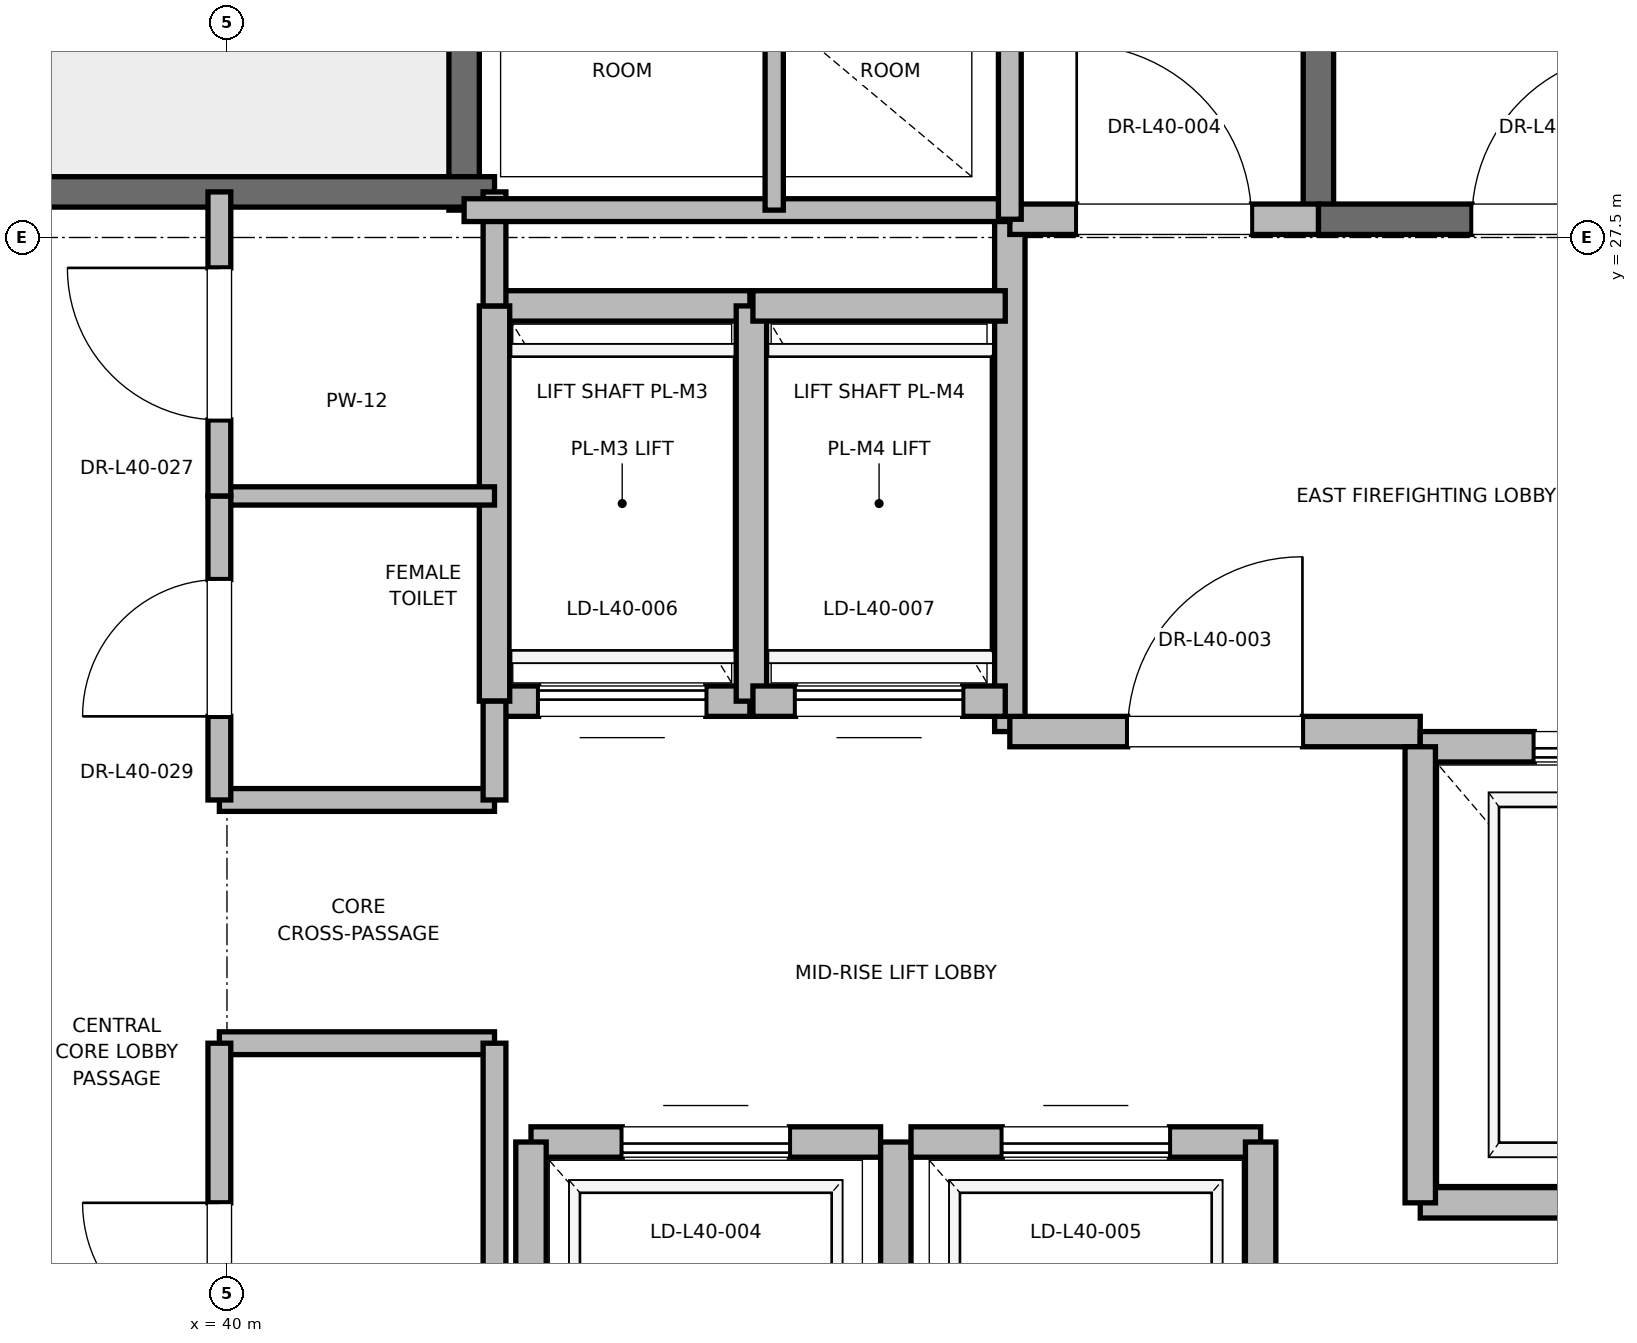
"""IFC4 building model, lengths in metres.
Left out: names, types, materials, properties, quantities, classifications, styles, units other than length and angle.
Written with IfcOpenShell. Run it as: python <this file> out.ifc"""

import sys

from ifc_helpers import new_model, si_unit, direction, frame, frame_2d, origin, place, context, subcontext, project, spatial, rectangle, extrude, element, fill, save


model = new_model("IFC4")
c1 = context("Model", 3, precision=1e-05, world=origin(), true_north=direction((0.0, 1.0)))
c2 = subcontext(c1, "Body", "Model", "MODEL_VIEW")
j1 = project(units=[si_unit("LENGTHUNIT", "METRE"), si_unit("PLANEANGLEUNIT", "RADIAN")], contexts=[c1])
p1 = place(None, origin())
s1 = spatial("IfcSite", under=j1, at=p1, CompositionType="ELEMENT")
p2 = place(p1, origin())
s2 = spatial("IfcBuilding", under=s1, at=p2, CompositionType="ELEMENT")
p3 = place(p2, frame((0.0, 0.0, 172.4)))
s3 = spatial("IfcBuildingStorey", under=s2, at=p3, CompositionType="ELEMENT", Elevation=172.4)
p4 = place(p3, frame((47.18, 27.62, 0.0), z_axis=(0.0, 0.0, 1.0), x_axis=(0.0, 1.0, 0.0)))
e1 = element("IfcWall", 1, at=p4, inside=s3, PredefinedType="SOLIDWALL", context=c2, shape_type="SweptSolid", body=[
    extrude(rectangle(XDim=8.18, YDim=0.2, at=frame_2d((4.09, 0.0))), origin(), (0.0, 0.0, 1.0), 3.775),
])
p5 = place(p3, frame((47.18, 27.62, 0.0), z_axis=(0.0, 0.0, 1.0), x_axis=(1.0, 0.0, 0.0)))
e2 = element("IfcWall", 2, at=p5, inside=s3, PredefinedType="SOLIDWALL", context=c2, shape_type="SweptSolid", body=[
    extrude(rectangle(XDim=3.12, YDim=0.2, at=frame_2d((1.56, 0.0))), origin(), (0.0, 0.0, 1.0), 3.775),
])
p6 = place(p5, frame((1.01, 0.0, 0.0)))
e3 = element("IfcOpeningElement", 3, at=p6, cuts=e2, PredefinedType="OPENING", context=c2, shape_type="SweptSolid", body=[
    extrude(rectangle(XDim=1.1, YDim=2.15, at=frame_2d((0.55, 1.075))), frame((0.0, 0.1, 0.0), z_axis=(0.0, -1.0, 0.0), x_axis=(1.0, 0.0, 0.0)), (0.0, 0.0, 1.0), 0.2),
])
p7 = place(p3, frame((41.56, 27.68, 0.0), z_axis=(0.0, 0.0, 1.0), x_axis=(0.0, 1.0, 0.0)))
e4 = element("IfcWall", 4, at=p7, inside=s3, PredefinedType="SOLIDWALL", context=c2, shape_type="SweptSolid", body=[
    extrude(rectangle(XDim=8.57, YDim=0.2, at=frame_2d((4.285, 0.0))), origin(), (0.0, 0.0, 1.0), 3.775),
])
p8 = place(p3, frame((38.44, 27.8, 0.0), z_axis=(0.0, 0.0, 1.0), x_axis=(1.0, 0.0, 0.0)))
e5 = element("IfcWall", 5, at=p8, inside=s3, PredefinedType="SOLIDWALL", context=c2, shape_type="SweptSolid", body=[
    extrude(rectangle(XDim=3.32, YDim=0.2, at=frame_2d((1.66, 0.0))), origin(), (0.0, 0.0, 1.0), 3.775),
])
p9 = place(p3, frame((45.15, 24.25, 0.0), z_axis=(0.0, 0.0, 1.0), x_axis=(0.0, 1.0, 0.0)))
e6 = element("IfcWall", 6, at=p9, inside=s3, PredefinedType="PARTITIONING", context=c2, shape_type="SweptSolid", body=[
    extrude(rectangle(XDim=3.37, YDim=0.2, at=frame_2d((1.685, 0.0))), origin(), (0.0, 0.0, 1.0), 3.775),
])
p10 = place(p3, frame((45.15, 24.25, 0.0), z_axis=(0.0, 0.0, 1.0), x_axis=(1.0, 0.0, 0.0)))
e7 = element("IfcWall", 7, at=p10, inside=s3, PredefinedType="PARTITIONING", context=c2, shape_type="SweptSolid", body=[
    extrude(rectangle(XDim=2.7, YDim=0.2, at=frame_2d((1.35, 0.0))), origin(), (0.0, 0.0, 1.0), 3.775),
])
p11 = place(p10, frame((0.775, 0.0, 0.0)))
e8 = element("IfcOpeningElement", 8, at=p11, cuts=e7, PredefinedType="OPENING", context=c2, shape_type="SweptSolid", body=[
    extrude(rectangle(XDim=1.15, YDim=2.2, at=frame_2d((0.575, 1.1))), frame((0.0, 0.1, 0.0), z_axis=(0.0, -1.0, 0.0), x_axis=(1.0, 0.0, 0.0)), (0.0, 0.0, 1.0), 0.2),
])
p12 = place(p3, frame((45.15, 27.62, 0.0), z_axis=(0.0, 0.0, 1.0), x_axis=(1.0, 0.0, 0.0)))
e9 = element("IfcWall", 9, at=p12, inside=s3, PredefinedType="PARTITIONING", context=c2, shape_type="SweptSolid", body=[
    extrude(rectangle(XDim=2.03, YDim=0.2, at=frame_2d((1.015, 0.0))), origin(), (0.0, 0.0, 1.0), 3.775),
])
p13 = place(p12, frame((0.44, 0.0, 0.0)))
e10 = element("IfcOpeningElement", 10, at=p13, cuts=e9, PredefinedType="OPENING", context=c2, shape_type="SweptSolid", body=[
    extrude(rectangle(XDim=1.15, YDim=2.2, at=frame_2d((0.575, 1.1))), frame((0.0, 0.1, 0.0), z_axis=(0.0, -1.0, 0.0), x_axis=(1.0, 0.0, 0.0)), (0.0, 0.0, 1.0), 0.2),
])
p14 = place(p3, frame((47.85, 21.15, 0.0), z_axis=(0.0, 0.0, 1.0), x_axis=(1.0, 0.0, 0.0)))
e11 = element("IfcWall", 11, at=p14, inside=s3, PredefinedType="SOLIDWALL", context=c2, shape_type="SweptSolid", body=[
    extrude(rectangle(XDim=2.6, YDim=0.2, at=frame_2d((1.3, 0.0))), origin(), (0.0, 0.0, 1.0), 3.775),
])
p15 = place(p3, frame((50.45, 24.15, 0.0), z_axis=(0.0, 0.0, 1.0), x_axis=(-1.0, 0.0, 0.0)))
e12 = element("IfcWall", 12, at=p15, inside=s3, PredefinedType="SOLIDWALL", context=c2, shape_type="SweptSolid", body=[
    extrude(rectangle(XDim=2.6, YDim=0.2, at=frame_2d((1.3, 0.0))), origin(), (0.0, 0.0, 1.0), 2.755),
])
p16 = place(p15, frame((0.75, 0.0, 0.0)))
e13 = element("IfcOpeningElement", 13, at=p16, cuts=e12, PredefinedType="OPENING", context=c2, shape_type="SweptSolid", body=[
    extrude(rectangle(XDim=1.1, YDim=2.2, at=frame_2d((0.55, 1.1))), frame((0.0, 0.1, 0.0), z_axis=(0.0, -1.0, 0.0), x_axis=(1.0, 0.0, 0.0)), (0.0, 0.0, 1.0), 0.2),
])
p17 = place(p3, frame((47.85, 24.15, 0.0), z_axis=(0.0, 0.0, 1.0), x_axis=(0.0, -1.0, 0.0)))
e14 = element("IfcWall", 14, at=p17, inside=s3, PredefinedType="SOLIDWALL", context=c2, shape_type="SweptSolid", body=[
    extrude(rectangle(XDim=3.0, YDim=0.2, at=frame_2d((1.5, 0.0))), origin(), (0.0, 0.0, 1.0), 3.775),
])
p18 = place(p3, frame((44.3, 21.55, 0.0), z_axis=(0.0, 0.0, 1.0), x_axis=(-1.0, 0.0, 0.0)))
e15 = element("IfcWall", 15, at=p18, inside=s3, PredefinedType="SOLIDWALL", context=c2, shape_type="SweptSolid", body=[
    extrude(rectangle(XDim=2.3, YDim=0.2, at=frame_2d((1.15, 0.0))), origin(), (0.0, 0.0, 1.0), 3.775),
])
p19 = place(p18, frame((0.6, 0.0, 0.0)))
e16 = element("IfcOpeningElement", 16, at=p19, cuts=e15, PredefinedType="OPENING", context=c2, shape_type="SweptSolid", body=[
    extrude(rectangle(XDim=1.1, YDim=2.2, at=frame_2d((0.55, 1.1))), frame((0.0, 0.1, 0.0), z_axis=(0.0, -1.0, 0.0), x_axis=(1.0, 0.0, 0.0)), (0.0, 0.0, 1.0), 0.2),
])
p20 = place(p3, frame((42.0, 21.55, 0.0), z_axis=(0.0, 0.0, 1.0), x_axis=(0.0, -1.0, 0.0)))
e17 = element("IfcWall", 17, at=p20, inside=s3, PredefinedType="SOLIDWALL", context=c2, shape_type="SweptSolid", body=[
    extrude(rectangle(XDim=2.6, YDim=0.2, at=frame_2d((1.3, 0.0))), origin(), (0.0, 0.0, 1.0), 2.755),
])
p21 = place(p3, frame((44.4, 18.95, 0.0), z_axis=(0.0, 0.0, 1.0), x_axis=(0.0, 1.0, 0.0)))
e18 = element("IfcWall", 18, at=p21, inside=s3, PredefinedType="SOLIDWALL", context=c2, shape_type="SweptSolid", body=[
    extrude(rectangle(XDim=2.6, YDim=0.2, at=frame_2d((1.3, 0.0))), origin(), (0.0, 0.0, 1.0), 3.775),
])
p22 = place(p3, frame((46.8, 21.55, 0.0), z_axis=(0.0, 0.0, 1.0), x_axis=(-1.0, 0.0, 0.0)))
e19 = element("IfcWall", 19, at=p22, inside=s3, PredefinedType="SOLIDWALL", context=c2, shape_type="SweptSolid", body=[
    extrude(rectangle(XDim=2.3, YDim=0.2, at=frame_2d((1.15, 0.0))), origin(), (0.0, 0.0, 1.0), 3.775),
])
p23 = place(p22, frame((0.6, 0.0, 0.0)))
e20 = element("IfcOpeningElement", 20, at=p23, cuts=e19, PredefinedType="OPENING", context=c2, shape_type="SweptSolid", body=[
    extrude(rectangle(XDim=1.1, YDim=2.2, at=frame_2d((0.55, 1.1))), frame((0.0, 0.1, 0.0), z_axis=(0.0, -1.0, 0.0), x_axis=(1.0, 0.0, 0.0)), (0.0, 0.0, 1.0), 0.2),
])
p24 = place(p3, frame((46.8, 18.95, 0.0), z_axis=(0.0, 0.0, 1.0), x_axis=(0.0, 1.0, 0.0)))
e21 = element("IfcWall", 21, at=p24, inside=s3, PredefinedType="SOLIDWALL", context=c2, shape_type="SweptSolid", body=[
    extrude(rectangle(XDim=2.6, YDim=0.2, at=frame_2d((1.3, 0.0))), origin(), (0.0, 0.0, 1.0), 3.775),
])
p25 = place(p3, frame((41.76, 24.45, 0.0), z_axis=(0.0, 0.0, 1.0), x_axis=(1.0, 0.0, 0.0)))
e22 = element("IfcWall", 22, at=p25, inside=s3, PredefinedType="SOLIDWALL", context=c2, shape_type="SweptSolid", body=[
    extrude(rectangle(XDim=1.68, YDim=0.2, at=frame_2d((0.84, 0.0))), origin(), (0.0, 0.0, 1.0), 3.775),
])
p26 = place(p25, frame((0.29, 0.0, 0.0)))
e23 = element("IfcOpeningElement", 23, at=p26, cuts=e22, PredefinedType="OPENING", context=c2, shape_type="SweptSolid", body=[
    extrude(rectangle(XDim=1.1, YDim=2.2, at=frame_2d((0.55, 1.1))), frame((0.0, 0.1, 0.0), z_axis=(0.0, -1.0, 0.0), x_axis=(1.0, 0.0, 0.0)), (0.0, 0.0, 1.0), 0.2),
])
p27 = place(p3, frame((43.44, 27.05, 0.0), z_axis=(0.0, 0.0, 1.0), x_axis=(-1.0, 0.0, 0.0)))
e24 = element("IfcWall", 24, at=p27, inside=s3, PredefinedType="SOLIDWALL", context=c2, shape_type="SweptSolid", body=[
    extrude(rectangle(XDim=1.68, YDim=0.2, at=frame_2d((0.84, 0.0))), origin(), (0.0, 0.0, 1.0), 3.775),
])
for number, where, z_axis, x_axis in (
    (25, (41.76, 27.05, 0.0), (0.0, 0.0, 1.0), (0.0, -1.0, 0.0)),
    (26, (43.45, 24.45, 0.0), (0.0, 0.0, 1.0), (0.0, 1.0, 0.0)),
):
    element("IfcWall", number, at=place(p3, frame(where, z_axis=z_axis, x_axis=x_axis)), inside=s3, PredefinedType="SOLIDWALL", context=c2, shape_type="SweptSolid", body=[
        extrude(rectangle(XDim=2.6, YDim=0.2, at=frame_2d((1.3, 0.0))), origin(), (0.0, 0.0, 1.0), 3.775),
    ])
p28 = place(p3, frame((43.46, 24.45, 0.0), z_axis=(0.0, 0.0, 1.0), x_axis=(1.0, 0.0, 0.0)))
e27 = element("IfcWall", 27, at=p28, inside=s3, PredefinedType="SOLIDWALL", context=c2, shape_type="SweptSolid", body=[
    extrude(rectangle(XDim=1.66, YDim=0.2, at=frame_2d((0.83, 0.0))), origin(), (0.0, 0.0, 1.0), 3.775),
])
p29 = place(p28, frame((0.28, 0.0, 0.0)))
e28 = element("IfcOpeningElement", 28, at=p29, cuts=e27, PredefinedType="OPENING", context=c2, shape_type="SweptSolid", body=[
    extrude(rectangle(XDim=1.1, YDim=2.2, at=frame_2d((0.55, 1.1))), frame((0.0, 0.1, 0.0), z_axis=(0.0, -1.0, 0.0), x_axis=(1.0, 0.0, 0.0)), (0.0, 0.0, 1.0), 0.2),
])
p30 = place(p3, frame((45.12, 27.05, 0.0), z_axis=(0.0, 0.0, 1.0), x_axis=(-1.0, 0.0, 0.0)))
e29 = element("IfcWall", 29, at=p30, inside=s3, PredefinedType="SOLIDWALL", context=c2, shape_type="SweptSolid", body=[
    extrude(rectangle(XDim=1.66, YDim=0.2, at=frame_2d((0.83, 0.0))), origin(), (0.0, 0.0, 1.0), 3.775),
])
for number, where, z_axis, x_axis in (
    (30, (39.95, 22.2, 0.0), (0.0, 0.0, 1.0), (1.0, 0.0, 0.0)),
    (31, (39.95, 23.8, 0.0), (0.0, 0.0, 1.0), (1.0, 0.0, 0.0)),
):
    element("IfcWall", number, at=place(p3, frame(where, z_axis=z_axis, x_axis=x_axis)), inside=s3, PredefinedType="PARTITIONING", context=c2, shape_type="SweptSolid", body=[
        extrude(rectangle(XDim=1.81, YDim=0.15, at=frame_2d((0.905, 0.0))), origin(), (0.0, 0.0, 1.0), 2.85),
    ])
p31 = place(p3, frame((39.95, 25.8, 0.0), z_axis=(0.0, 0.0, 1.0), x_axis=(1.0, 0.0, 0.0)))
e32 = element("IfcWall", 32, at=p31, inside=s3, PredefinedType="PARTITIONING", context=c2, shape_type="SweptSolid", body=[
    extrude(rectangle(XDim=1.81, YDim=0.12, at=frame_2d((0.905, 0.0))), origin(), (0.0, 0.0, 1.0), 2.85),
])
p32 = place(p3, frame((41.76, 18.6, 0.0), z_axis=(0.0, 0.0, 1.0), x_axis=(0.0, 1.0, 0.0)))
e33 = element("IfcWall", 33, at=p32, inside=s3, PredefinedType="PARTITIONING", context=c2, shape_type="SweptSolid", body=[
    extrude(rectangle(XDim=3.6, YDim=0.15, at=frame_2d((1.8, 0.0))), origin(), (0.0, 0.0, 1.0), 2.755),
])
p33 = place(p3, frame((41.76, 23.8, 0.0), z_axis=(0.0, 0.0, 1.0), x_axis=(0.0, 1.0, 0.0)))
e34 = element("IfcWall", 34, at=p33, inside=s3, PredefinedType="PARTITIONING", context=c2, shape_type="SweptSolid", body=[
    extrude(rectangle(XDim=0.65, YDim=0.15, at=frame_2d((0.325, 0.0))), origin(), (0.0, 0.0, 1.0), 2.85),
])
p34 = place(p3, frame((41.76, 27.05, 0.0), z_axis=(0.0, 0.0, 1.0), x_axis=(0.0, 1.0, 0.0)))
e35 = element("IfcWall", 35, at=p34, inside=s3, PredefinedType="PARTITIONING", context=c2, shape_type="SweptSolid", body=[
    extrude(rectangle(XDim=0.75, YDim=0.15, at=frame_2d((0.375, 0.0))), origin(), (0.0, 0.0, 1.0), 2.85),
])
p35 = place(p3, frame((39.95, 19.2, 0.0), z_axis=(0.0, 0.0, 1.0), x_axis=(0.0, 1.0, 0.0)))
e36 = element("IfcWall", 36, at=p35, inside=s3, PredefinedType="PARTITIONING", context=c2, shape_type="SweptSolid", body=[
    extrude(rectangle(XDim=3.0, YDim=0.15, at=frame_2d((1.5, 0.0))), origin(), (0.0, 0.0, 1.0), 2.85),
])
p36 = place(p35, frame((1.05, 0.0, 0.0)))
e37 = element("IfcOpeningElement", 37, at=p36, cuts=e36, PredefinedType="OPENING", context=c2, shape_type="SweptSolid", body=[
    extrude(rectangle(XDim=0.9, YDim=2.1, at=frame_2d((0.45, 1.05))), frame((0.0, 0.075, 0.0), z_axis=(0.0, -1.0, 0.0), x_axis=(1.0, 0.0, 0.0)), (0.0, 0.0, 1.0), 0.15),
])
p37 = place(p3, frame((39.95, 23.8, 0.0), z_axis=(0.0, 0.0, 1.0), x_axis=(0.0, 1.0, 0.0)))
e38 = element("IfcWall", 38, at=p37, inside=s3, PredefinedType="PARTITIONING", context=c2, shape_type="SweptSolid", body=[
    extrude(rectangle(XDim=2.0, YDim=0.15, at=frame_2d((1.0, 0.0))), origin(), (0.0, 0.0, 1.0), 2.85),
])
p38 = place(p37, frame((0.55, 0.0, 0.0)))
e39 = element("IfcOpeningElement", 39, at=p38, cuts=e38, PredefinedType="OPENING", context=c2, shape_type="SweptSolid", body=[
    extrude(rectangle(XDim=0.9, YDim=2.1, at=frame_2d((0.45, 1.05))), frame((0.0, 0.075, 0.0), z_axis=(0.0, -1.0, 0.0), x_axis=(1.0, 0.0, 0.0)), (0.0, 0.0, 1.0), 0.15),
])
p39 = place(p3, frame((39.95, 25.8, 0.0), z_axis=(0.0, 0.0, 1.0), x_axis=(0.0, 1.0, 0.0)))
e40 = element("IfcWall", 40, at=p39, inside=s3, PredefinedType="PARTITIONING", context=c2, shape_type="SweptSolid", body=[
    extrude(rectangle(XDim=2.0, YDim=0.15, at=frame_2d((1.0, 0.0))), origin(), (0.0, 0.0, 1.0), 2.85),
])
p40 = place(p39, frame((0.5, 0.0, 0.0)))
e41 = element("IfcOpeningElement", 41, at=p40, cuts=e40, PredefinedType="OPENING", context=c2, shape_type="SweptSolid", body=[
    extrude(rectangle(XDim=1.0, YDim=2.15, at=frame_2d((0.5, 1.075))), frame((0.0, 0.075, 0.0), z_axis=(0.0, -1.0, 0.0), x_axis=(1.0, 0.0, 0.0)), (0.0, 0.0, 1.0), 0.15),
])
p41 = place(p3, frame((41.56, 27.68, 0.0), z_axis=(0.0, 0.0, 1.0), x_axis=(1.0, 0.0, 0.0)))
e42 = element("IfcWall", 42, at=p41, inside=s3, PredefinedType="PARTITIONING", context=c2, shape_type="SweptSolid", body=[
    extrude(rectangle(XDim=3.59, YDim=0.15, at=frame_2d((1.795, 0.0))), origin(), (0.0, 0.0, 1.0), 2.85),
])
p42 = place(p3, frame((45.15, 27.62, 0.0), z_axis=(0.0, 0.0, 1.0), x_axis=(0.0, 1.0, 0.0)))
e43 = element("IfcWall", 43, at=p42, inside=s3, PredefinedType="PARTITIONING", context=c2, shape_type="SweptSolid", body=[
    extrude(rectangle(XDim=3.1, YDim=0.15, at=frame_2d((1.55, 0.0))), origin(), (0.0, 0.0, 1.0), 2.85),
])
p43 = place(p3, frame((43.6, 27.68, 0.0), z_axis=(0.0, 0.0, 1.0), x_axis=(0.0, 1.0, 0.0)))
e44 = element("IfcWall", 44, at=p43, inside=s3, PredefinedType="PARTITIONING", context=c2, shape_type="SweptSolid", body=[
    extrude(rectangle(XDim=3.04, YDim=0.12, at=frame_2d((1.52, 0.0))), origin(), (0.0, 0.0, 1.0), 2.85),
])
p44 = place(p6, origin())
e45 = element("IfcDoor", 45, at=p44, inside=s3, OperationType="SINGLE_SWING_RIGHT", PredefinedType="DOOR", context=c2, shape_type="SweptSolid", body=[
    extrude(rectangle(XDim=1.1, YDim=2.15, at=frame_2d((0.55, 1.075))), frame((0.0, 0.025, 0.0), z_axis=(0.0, -1.0, 0.0), x_axis=(1.0, 0.0, 0.0)), (0.0, 0.0, 1.0), 0.05),
])
fill(e3, e45)
p45 = place(p11, origin())
e46 = element("IfcDoor", 46, at=p45, inside=s3, OperationType="SINGLE_SWING_RIGHT", PredefinedType="DOOR", context=c2, shape_type="SweptSolid", body=[
    extrude(rectangle(XDim=1.15, YDim=2.2, at=frame_2d((0.575, 1.1))), frame((0.0, 0.025, 0.0), z_axis=(0.0, -1.0, 0.0), x_axis=(1.0, 0.0, 0.0)), (0.0, 0.0, 1.0), 0.05),
])
fill(e8, e46)
p46 = place(p13, origin())
e47 = element("IfcDoor", 47, at=p46, inside=s3, OperationType="SINGLE_SWING_LEFT", PredefinedType="DOOR", context=c2, shape_type="SweptSolid", body=[
    extrude(rectangle(XDim=1.15, YDim=2.2, at=frame_2d((0.575, 1.1))), frame((0.0, 0.025, 0.0), z_axis=(0.0, -1.0, 0.0), x_axis=(1.0, 0.0, 0.0)), (0.0, 0.0, 1.0), 0.05),
])
fill(e10, e47)
p47 = place(p16, origin())
e48 = element("IfcDoor", 48, at=p47, inside=s3, OperationType="SLIDING_TO_RIGHT", PredefinedType="DOOR", context=c2, shape_type="SweptSolid", body=[
    extrude(rectangle(XDim=1.1, YDim=2.2, at=frame_2d((0.55, 1.1))), frame((0.0, 0.025, 0.0), z_axis=(0.0, -1.0, 0.0), x_axis=(1.0, 0.0, 0.0)), (0.0, 0.0, 1.0), 0.05),
])
fill(e13, e48)
p48 = place(p19, origin())
e49 = element("IfcDoor", 49, at=p48, inside=s3, OperationType="SLIDING_TO_RIGHT", PredefinedType="DOOR", context=c2, shape_type="SweptSolid", body=[
    extrude(rectangle(XDim=1.1, YDim=2.2, at=frame_2d((0.55, 1.1))), frame((0.0, 0.025, 0.0), z_axis=(0.0, -1.0, 0.0), x_axis=(1.0, 0.0, 0.0)), (0.0, 0.0, 1.0), 0.05),
])
fill(e16, e49)
p49 = place(p23, origin())
e50 = element("IfcDoor", 50, at=p49, inside=s3, OperationType="SLIDING_TO_RIGHT", PredefinedType="DOOR", context=c2, shape_type="SweptSolid", body=[
    extrude(rectangle(XDim=1.1, YDim=2.2, at=frame_2d((0.55, 1.1))), frame((0.0, 0.025, 0.0), z_axis=(0.0, -1.0, 0.0), x_axis=(1.0, 0.0, 0.0)), (0.0, 0.0, 1.0), 0.05),
])
fill(e20, e50)
p50 = place(p26, origin())
e51 = element("IfcDoor", 51, at=p50, inside=s3, OperationType="SLIDING_TO_RIGHT", PredefinedType="DOOR", context=c2, shape_type="SweptSolid", body=[
    extrude(rectangle(XDim=1.1, YDim=2.2, at=frame_2d((0.55, 1.1))), frame((0.0, 0.025, 0.0), z_axis=(0.0, -1.0, 0.0), x_axis=(1.0, 0.0, 0.0)), (0.0, 0.0, 1.0), 0.05),
])
fill(e23, e51)
p51 = place(p29, origin())
e52 = element("IfcDoor", 52, at=p51, inside=s3, OperationType="SLIDING_TO_RIGHT", PredefinedType="DOOR", context=c2, shape_type="SweptSolid", body=[
    extrude(rectangle(XDim=1.1, YDim=2.2, at=frame_2d((0.55, 1.1))), frame((0.0, 0.025, 0.0), z_axis=(0.0, -1.0, 0.0), x_axis=(1.0, 0.0, 0.0)), (0.0, 0.0, 1.0), 0.05),
])
fill(e28, e52)
p52 = place(p36, origin())
e53 = element("IfcDoor", 53, at=p52, inside=s3, OperationType="SINGLE_SWING_RIGHT", PredefinedType="DOOR", context=c2, shape_type="SweptSolid", body=[
    extrude(rectangle(XDim=0.9, YDim=2.1, at=frame_2d((0.45, 1.05))), frame((0.0, 0.025, 0.0), z_axis=(0.0, -1.0, 0.0), x_axis=(1.0, 0.0, 0.0)), (0.0, 0.0, 1.0), 0.05),
])
fill(e37, e53)
p53 = place(p38, origin())
e54 = element("IfcDoor", 54, at=p53, inside=s3, OperationType="SINGLE_SWING_LEFT", PredefinedType="DOOR", context=c2, shape_type="SweptSolid", body=[
    extrude(rectangle(XDim=0.9, YDim=2.1, at=frame_2d((0.45, 1.05))), frame((0.0, 0.025, 0.0), z_axis=(0.0, -1.0, 0.0), x_axis=(1.0, 0.0, 0.0)), (0.0, 0.0, 1.0), 0.05),
])
fill(e39, e54)
p54 = place(p40, origin())
e55 = element("IfcDoor", 55, at=p54, inside=s3, OperationType="SINGLE_SWING_RIGHT", PredefinedType="DOOR", context=c2, shape_type="SweptSolid", body=[
    extrude(rectangle(XDim=1.0, YDim=2.15, at=frame_2d((0.5, 1.075))), frame((0.0, 0.025, 0.0), z_axis=(0.0, -1.0, 0.0), x_axis=(1.0, 0.0, 0.0)), (0.0, 0.0, 1.0), 0.05),
])
fill(e41, e55)
save(model, sys.argv[1])
